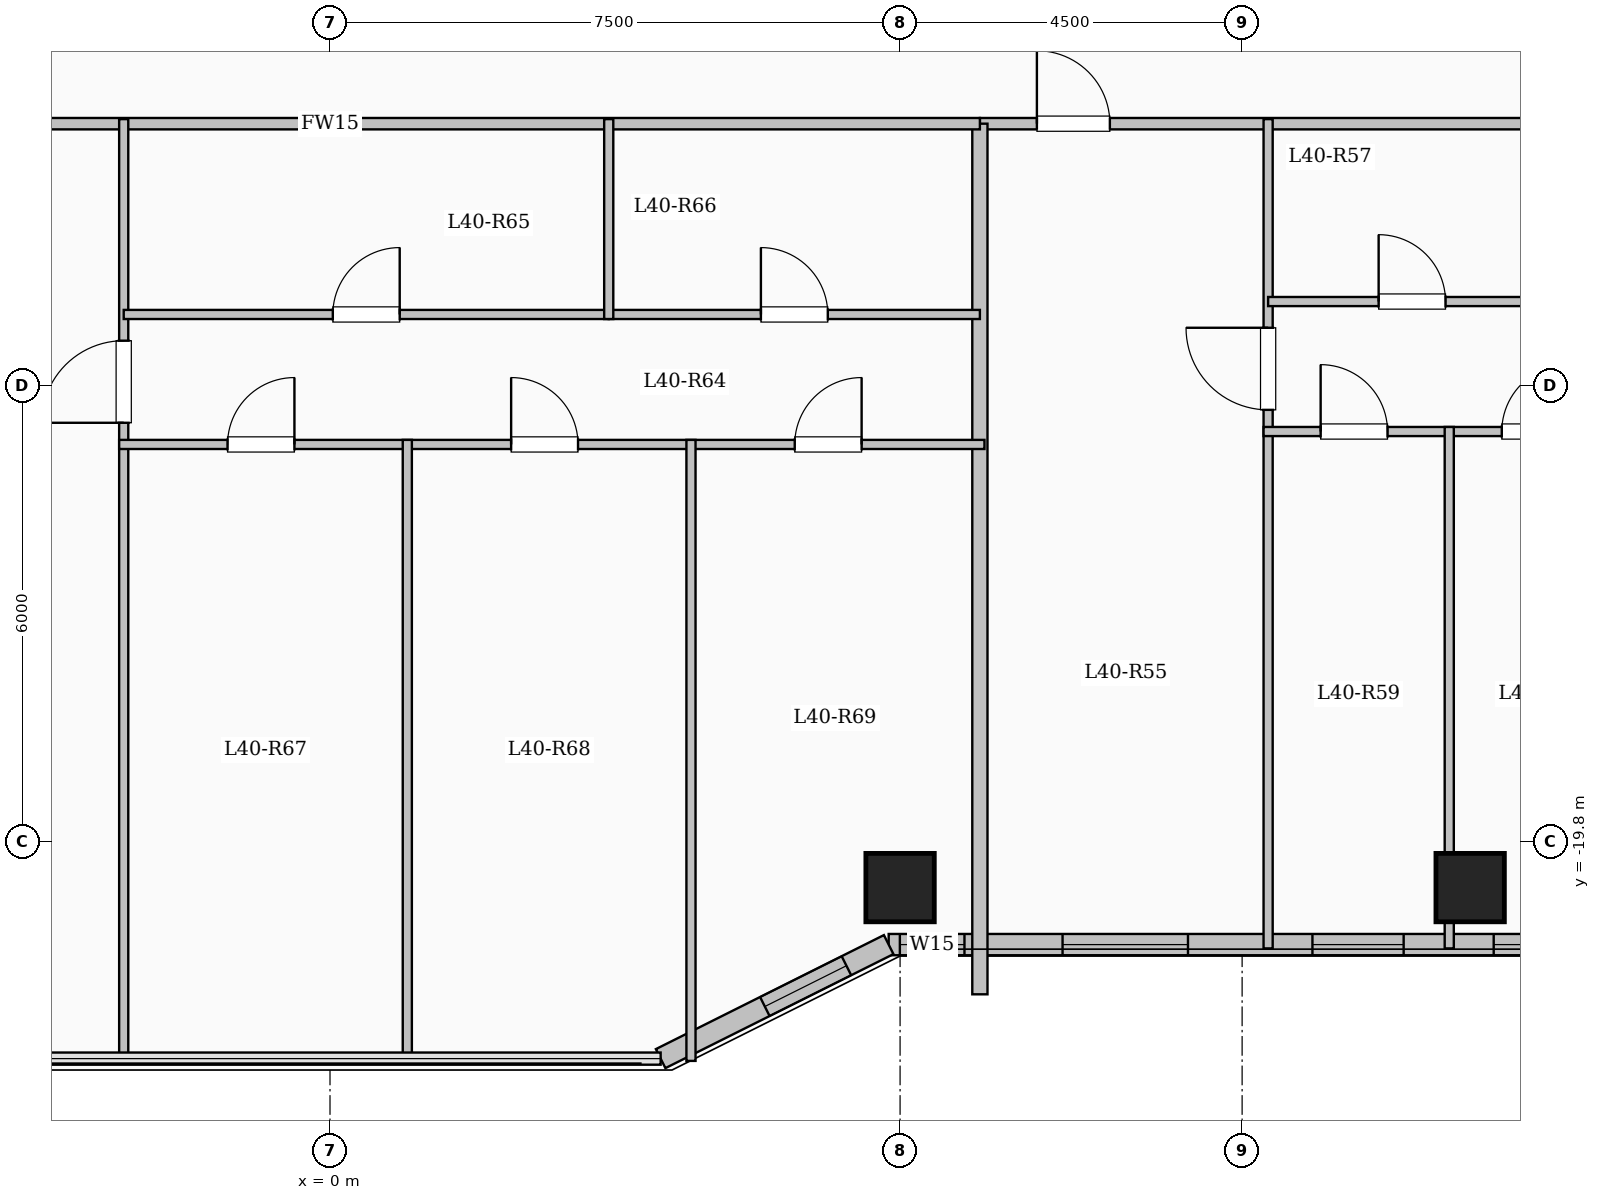
"""IFC4 building model, lengths in metres.
Left out: names, types, materials, properties, quantities, classifications, styles, units other than length and angle.
Written with IfcOpenShell. Run it as: python <this file> out.ifc"""

import sys

from ifc_helpers import new_model, si_unit, direction, frame, frame_2d, origin, origin_2d, place, context, subcontext, project, spatial, rectangle, extrude, element, fill, save


model = new_model("IFC4")
c1 = context("Model", 3, precision=1e-05, world=origin(), true_north=direction((0.0, 1.0)))
c2 = subcontext(c1, "Body", "Model", "MODEL_VIEW")
j1 = project(units=[si_unit("LENGTHUNIT", "METRE"), si_unit("PLANEANGLEUNIT", "RADIAN")], contexts=[c1])
p1 = place(None, origin())
s1 = spatial("IfcSite", under=j1, at=p1, CompositionType="ELEMENT")
p2 = place(p1, origin())
s2 = spatial("IfcBuilding", under=s1, at=p2, CompositionType="ELEMENT")
p3 = place(p2, frame((0.0, 0.0, 149.35)))
s3 = spatial("IfcBuildingStorey", under=s2, at=p3, CompositionType="ELEMENT", Elevation=149.35)
for number, where, z_axis, x_axis in (
    (1, (7.5, -20.4, 0.0), (0.0, 0.0, 1.0), (1.0, 0.0, 0.0)),
    (2, (15.0, -20.4, 0.0), (0.0, 0.0, 1.0), (1.0, 0.0, 0.0)),
):
    element("IfcColumn", number, at=place(p3, frame(where, z_axis=z_axis, x_axis=x_axis)), inside=s3, PredefinedType="COLUMN", context=c2, shape_type="SweptSolid", body=[
        extrude(rectangle(XDim=0.9, YDim=0.9, at=origin_2d()), origin(), (0.0, 0.0, 1.0), 3.35),
    ])
p4 = place(p3, frame((19.65, -21.15, 0.0), z_axis=(0.0, 0.0, 1.0), x_axis=(-1.0, 0.0, 0.0)))
e3 = element("IfcWall", 3, at=p4, inside=s3, PredefinedType="SOLIDWALL", context=c2, shape_type="SweptSolid", body=[
    extrude(rectangle(XDim=12.3, YDim=0.28, at=frame_2d((6.15, 0.0))), origin(), (0.0, 0.0, 1.0), 3.1),
])
p5 = place(p4, frame((0.705, 0.0, 0.95)))
e4 = element("IfcOpeningElement", 4, at=p5, cuts=e3, PredefinedType="OPENING", context=c2, shape_type="SweptSolid", body=[
    extrude(rectangle(XDim=1.2, YDim=1.5, at=frame_2d((0.6, 0.75))), frame((0.0, 0.15, 0.0), z_axis=(0.0, -1.0, 0.0), x_axis=(1.0, 0.0, 0.0)), (0.0, 0.0, 1.0), 0.3),
])
p6 = place(p4, frame((3.14, 0.0, 0.95)))
e5 = element("IfcOpeningElement", 5, at=p6, cuts=e3, PredefinedType="OPENING", context=c2, shape_type="SweptSolid", body=[
    extrude(rectangle(XDim=1.2, YDim=1.5, at=frame_2d((0.6, 0.75))), frame((0.0, 0.15, 0.0), z_axis=(0.0, -1.0, 0.0), x_axis=(1.0, 0.0, 0.0)), (0.0, 0.0, 1.0), 0.3),
])
p7 = place(p4, frame((5.525, 0.0, 0.95)))
e6 = element("IfcOpeningElement", 6, at=p7, cuts=e3, PredefinedType="OPENING", context=c2, shape_type="SweptSolid", body=[
    extrude(rectangle(XDim=1.2, YDim=1.5, at=frame_2d((0.6, 0.75))), frame((0.0, 0.15, 0.0), z_axis=(0.0, -1.0, 0.0), x_axis=(1.0, 0.0, 0.0)), (0.0, 0.0, 1.0), 0.3),
])
p8 = place(p4, frame((8.362, 0.0, 0.9)))
e7 = element("IfcOpeningElement", 7, at=p8, cuts=e3, PredefinedType="OPENING", context=c2, shape_type="SweptSolid", body=[
    extrude(rectangle(XDim=1.65, YDim=1.6, at=frame_2d((0.825, 0.8))), frame((0.0, 0.15, 0.0), z_axis=(0.0, -1.0, 0.0), x_axis=(1.0, 0.0, 0.0)), (0.0, 0.0, 1.0), 0.3),
])
p9 = place(p4, frame((11.303, 0.0, 0.95)))
e8 = element("IfcOpeningElement", 8, at=p9, cuts=e3, PredefinedType="OPENING", context=c2, shape_type="SweptSolid", body=[
    extrude(rectangle(XDim=0.85, YDim=1.5, at=frame_2d((0.425, 0.75))), frame((0.0, 0.15, 0.0), z_axis=(0.0, -1.0, 0.0), x_axis=(1.0, 0.0, 0.0)), (0.0, 0.0, 1.0), 0.3),
])
p10 = place(p3, frame((7.35, -21.15, 0.0), z_axis=(0.0, 0.0, 1.0), x_axis=(-0.894427191, -0.4472135955, 0.0)))
e9 = element("IfcWall", 9, at=p10, inside=s3, PredefinedType="SOLIDWALL", context=c2, shape_type="SweptSolid", body=[
    extrude(rectangle(XDim=3.354, YDim=0.28, at=frame_2d((1.677, 0.0))), origin(), (0.0, 0.0, 1.0), 3.1),
])
p11 = place(p10, frame((0.622, 0.0, 0.95)))
e10 = element("IfcOpeningElement", 10, at=p11, cuts=e9, PredefinedType="OPENING", context=c2, shape_type="SweptSolid", body=[
    extrude(rectangle(XDim=1.2, YDim=1.5, at=frame_2d((0.6, 0.75))), frame((0.0, 0.15, 0.0), z_axis=(0.0, -1.0, 0.0), x_axis=(1.0, 0.0, 0.0)), (0.0, 0.0, 1.0), 0.3),
])
p12 = place(p3, frame((8.55, -10.35, 0.0), z_axis=(0.0, 0.0, 1.0), x_axis=(1.0, 0.0, 0.0)))
e11 = element("IfcWall", 11, at=p12, inside=s3, PredefinedType="PARTITIONING", context=c2, shape_type="SweptSolid", body=[
    extrude(rectangle(XDim=11.0, YDim=0.15, at=frame_2d((5.5, 0.0))), origin(), (0.0, 0.0, 1.0), 3.1),
])
p13 = place(p12, frame((0.75, 0.0, 0.0)))
e12 = element("IfcOpeningElement", 12, at=p13, cuts=e11, PredefinedType="OPENING", context=c2, shape_type="SweptSolid", body=[
    extrude(rectangle(XDim=0.96, YDim=2.15, at=frame_2d((0.48, 1.075))), frame((0.0, 0.085, 0.0), z_axis=(0.0, -1.0, 0.0), x_axis=(1.0, 0.0, 0.0)), (0.0, 0.0, 1.0), 0.17),
])
p14 = place(p3, frame((12.342, -21.2, 0.0), z_axis=(0.0, 0.0, 1.0), x_axis=(0.0, 1.0, 0.0)))
e13 = element("IfcWall", 13, at=p14, inside=s3, PredefinedType="PARTITIONING", context=c2, shape_type="SweptSolid", body=[
    extrude(rectangle(XDim=10.91, YDim=0.12, at=frame_2d((5.455, 0.0))), origin(), (0.0, 0.0, 1.0), 3.1),
])
p15 = place(p14, frame((7.085, 0.0, 0.0)))
e14 = element("IfcOpeningElement", 14, at=p15, cuts=e13, PredefinedType="OPENING", context=c2, shape_type="SweptSolid", body=[
    extrude(rectangle(XDim=1.08, YDim=2.15, at=frame_2d((0.54, 1.075))), frame((0.0, 0.07, 0.0), z_axis=(0.0, -1.0, 0.0), x_axis=(1.0, 0.0, 0.0)), (0.0, 0.0, 1.0), 0.14),
])
p16 = place(p3, frame((12.342, -12.69, 0.0), z_axis=(0.0, 0.0, 1.0), x_axis=(1.0, 0.0, 0.0)))
e15 = element("IfcWall", 15, at=p16, inside=s3, PredefinedType="PARTITIONING", context=c2, shape_type="SweptSolid", body=[
    extrude(rectangle(XDim=3.788, YDim=0.12, at=frame_2d((1.894, 0.0))), origin(), (0.0, 0.0, 1.0), 3.1),
])
p17 = place(p16, frame((1.454, 0.0, 0.0)))
e16 = element("IfcOpeningElement", 16, at=p17, cuts=e15, PredefinedType="OPENING", context=c2, shape_type="SweptSolid", body=[
    extrude(rectangle(XDim=0.88, YDim=2.1, at=frame_2d((0.44, 1.05))), frame((0.0, 0.07, 0.0), z_axis=(0.0, -1.0, 0.0), x_axis=(1.0, 0.0, 0.0)), (0.0, 0.0, 1.0), 0.14),
])
p18 = place(p3, frame((12.282, -14.4, 0.0), z_axis=(0.0, 0.0, 1.0), x_axis=(1.0, 0.0, 0.0)))
e17 = element("IfcWall", 17, at=p18, inside=s3, PredefinedType="PARTITIONING", context=c2, shape_type="SweptSolid", body=[
    extrude(rectangle(XDim=7.328, YDim=0.12, at=frame_2d((3.664, 0.0))), origin(), (0.0, 0.0, 1.0), 3.1),
])
p19 = place(p18, frame((0.751, 0.0, 0.0)))
e18 = element("IfcOpeningElement", 18, at=p19, cuts=e17, PredefinedType="OPENING", context=c2, shape_type="SweptSolid", body=[
    extrude(rectangle(XDim=0.88, YDim=2.1, at=frame_2d((0.44, 1.05))), frame((0.0, 0.07, 0.0), z_axis=(0.0, -1.0, 0.0), x_axis=(1.0, 0.0, 0.0)), (0.0, 0.0, 1.0), 0.14),
])
p20 = place(p18, frame((3.134, 0.0, 0.0)))
e19 = element("IfcOpeningElement", 19, at=p20, cuts=e17, PredefinedType="OPENING", context=c2, shape_type="SweptSolid", body=[
    extrude(rectangle(XDim=0.88, YDim=2.1, at=frame_2d((0.44, 1.05))), frame((0.0, 0.07, 0.0), z_axis=(0.0, -1.0, 0.0), x_axis=(1.0, 0.0, 0.0)), (0.0, 0.0, 1.0), 0.14),
])
p21 = place(p18, frame((5.517, 0.0, 0.0)))
e20 = element("IfcOpeningElement", 20, at=p21, cuts=e17, PredefinedType="OPENING", context=c2, shape_type="SweptSolid", body=[
    extrude(rectangle(XDim=0.88, YDim=2.1, at=frame_2d((0.44, 1.05))), frame((0.0, 0.07, 0.0), z_axis=(0.0, -1.0, 0.0), x_axis=(1.0, 0.0, 0.0)), (0.0, 0.0, 1.0), 0.14),
])
p22 = place(p3, frame((14.725, -21.2, 0.0), z_axis=(0.0, 0.0, 1.0), x_axis=(0.0, 1.0, 0.0)))
e21 = element("IfcWall", 21, at=p22, inside=s3, PredefinedType="PARTITIONING", context=c2, shape_type="SweptSolid", body=[
    extrude(rectangle(XDim=6.86, YDim=0.12, at=frame_2d((3.43, 0.0))), origin(), (0.0, 0.0, 1.0), 2.585),
])
p23 = place(p3, frame((8.55, -21.804, 0.0), z_axis=(0.0, 0.0, 1.0), x_axis=(0.0, 1.0, 0.0)))
e22 = element("IfcWall", 22, at=p23, inside=s3, PredefinedType="SOLIDWALL", context=c2, shape_type="SweptSolid", body=[
    extrude(rectangle(XDim=11.454, YDim=0.2, at=frame_2d((5.727, 0.0))), origin(), (0.0, 0.0, 1.0), 3.1),
])
p24 = place(p3, frame((-8.55, -10.35, 0.0), z_axis=(0.0, 0.0, 1.0), x_axis=(1.0, 0.0, 0.0)))
e23 = element("IfcWall", 23, at=p24, inside=s3, PredefinedType="PARTITIONING", context=c2, shape_type="SweptSolid", body=[
    extrude(rectangle(XDim=17.1, YDim=0.15, at=frame_2d((8.55, 0.0))), origin(), (0.0, 0.0, 1.0), 3.1),
])
p25 = place(p24, frame((1.6, 0.0, 0.0)))
e24 = element("IfcOpeningElement", 24, at=p25, cuts=e23, PredefinedType="OPENING", context=c2, shape_type="SweptSolid", body=[
    extrude(rectangle(XDim=0.96, YDim=2.15, at=frame_2d((0.48, 1.075))), frame((0.0, 0.085, 0.0), z_axis=(0.0, -1.0, 0.0), x_axis=(1.0, 0.0, 0.0)), (0.0, 0.0, 1.0), 0.17),
])
p26 = place(p3, frame((-2.714, -22.68, 0.0), z_axis=(0.0, 0.0, 1.0), x_axis=(0.0, 1.0, 0.0)))
e25 = element("IfcWall", 25, at=p26, inside=s3, PredefinedType="PARTITIONING", context=c2, shape_type="SweptSolid", body=[
    extrude(rectangle(XDim=12.39, YDim=0.12, at=frame_2d((6.195, 0.0))), origin(), (0.0, 0.0, 1.0), 3.1),
])
p27 = place(p26, frame((8.395, 0.0, 0.0)))
e26 = element("IfcOpeningElement", 26, at=p27, cuts=e25, PredefinedType="OPENING", context=c2, shape_type="SweptSolid", body=[
    extrude(rectangle(XDim=1.08, YDim=2.15, at=frame_2d((0.54, 1.075))), frame((0.0, 0.07, 0.0), z_axis=(0.0, -1.0, 0.0), x_axis=(1.0, 0.0, 0.0)), (0.0, 0.0, 1.0), 0.14),
])
p28 = place(p3, frame((-2.714, -12.86, 0.0), z_axis=(0.0, 0.0, 1.0), x_axis=(1.0, 0.0, 0.0)))
e27 = element("IfcWall", 27, at=p28, inside=s3, PredefinedType="PARTITIONING", context=c2, shape_type="SweptSolid", body=[
    extrude(rectangle(XDim=6.381, YDim=0.12, at=frame_2d((3.19, 0.0))), origin(), (0.0, 0.0, 1.0), 3.1),
])
p29 = place(p28, frame((2.751, 0.0, 0.0)))
e28 = element("IfcOpeningElement", 28, at=p29, cuts=e27, PredefinedType="OPENING", context=c2, shape_type="SweptSolid", body=[
    extrude(rectangle(XDim=0.88, YDim=2.1, at=frame_2d((0.44, 1.05))), frame((0.0, 0.07, 0.0), z_axis=(0.0, -1.0, 0.0), x_axis=(1.0, 0.0, 0.0)), (0.0, 0.0, 1.0), 0.14),
])
p30 = place(p3, frame((3.667, -12.86, 0.0), z_axis=(0.0, 0.0, 1.0), x_axis=(1.0, 0.0, 0.0)))
e29 = element("IfcWall", 29, at=p30, inside=s3, PredefinedType="PARTITIONING", context=c2, shape_type="SweptSolid", body=[
    extrude(rectangle(XDim=4.883, YDim=0.12, at=frame_2d((2.441, 0.0))), origin(), (0.0, 0.0, 1.0), 3.1),
])
p31 = place(p30, frame((2.002, 0.0, 0.0)))
e30 = element("IfcOpeningElement", 30, at=p31, cuts=e29, PredefinedType="OPENING", context=c2, shape_type="SweptSolid", body=[
    extrude(rectangle(XDim=0.88, YDim=2.1, at=frame_2d((0.44, 1.05))), frame((0.0, 0.07, 0.0), z_axis=(0.0, -1.0, 0.0), x_axis=(1.0, 0.0, 0.0)), (0.0, 0.0, 1.0), 0.14),
])
p32 = place(p3, frame((-2.774, -14.57, 0.0), z_axis=(0.0, 0.0, 1.0), x_axis=(1.0, 0.0, 0.0)))
e31 = element("IfcWall", 31, at=p32, inside=s3, PredefinedType="PARTITIONING", context=c2, shape_type="SweptSolid", body=[
    extrude(rectangle(XDim=11.384, YDim=0.12, at=frame_2d((5.692, 0.0))), origin(), (0.0, 0.0, 1.0), 3.1),
])
p33 = place(p32, frame((1.426, 0.0, 0.0)))
e32 = element("IfcOpeningElement", 32, at=p33, cuts=e31, PredefinedType="OPENING", context=c2, shape_type="SweptSolid", body=[
    extrude(rectangle(XDim=0.88, YDim=2.1, at=frame_2d((0.44, 1.05))), frame((0.0, 0.07, 0.0), z_axis=(0.0, -1.0, 0.0), x_axis=(1.0, 0.0, 0.0)), (0.0, 0.0, 1.0), 0.14),
])
p34 = place(p32, frame((5.157, 0.0, 0.0)))
e33 = element("IfcOpeningElement", 33, at=p34, cuts=e31, PredefinedType="OPENING", context=c2, shape_type="SweptSolid", body=[
    extrude(rectangle(XDim=0.88, YDim=2.1, at=frame_2d((0.44, 1.05))), frame((0.0, 0.07, 0.0), z_axis=(0.0, -1.0, 0.0), x_axis=(1.0, 0.0, 0.0)), (0.0, 0.0, 1.0), 0.14),
])
p35 = place(p32, frame((8.888, 0.0, 0.0)))
e34 = element("IfcOpeningElement", 34, at=p35, cuts=e31, PredefinedType="OPENING", context=c2, shape_type="SweptSolid", body=[
    extrude(rectangle(XDim=0.88, YDim=2.1, at=frame_2d((0.44, 1.05))), frame((0.0, 0.07, 0.0), z_axis=(0.0, -1.0, 0.0), x_axis=(1.0, 0.0, 0.0)), (0.0, 0.0, 1.0), 0.14),
])
p36 = place(p3, frame((3.667, -12.92, 0.0), z_axis=(0.0, 0.0, 1.0), x_axis=(0.0, 1.0, 0.0)))
e35 = element("IfcWall", 35, at=p36, inside=s3, PredefinedType="PARTITIONING", context=c2, shape_type="SweptSolid", body=[
    extrude(rectangle(XDim=2.63, YDim=0.12, at=frame_2d((1.315, 0.0))), origin(), (0.0, 0.0, 1.0), 3.1),
])
for number, where, z_axis, x_axis in (
    (36, (1.017, -22.68, 0.0), (0.0, 0.0, 1.0), (0.0, 1.0, 0.0)),
    (37, (4.749, -22.68, 0.0), (0.0, 0.0, 1.0), (0.0, 1.0, 0.0)),
):
    element("IfcWall", number, at=place(p3, frame(where, z_axis=z_axis, x_axis=x_axis)), inside=s3, PredefinedType="PARTITIONING", context=c2, shape_type="SweptSolid", body=[
        extrude(rectangle(XDim=8.17, YDim=0.12, at=frame_2d((4.085, 0.0))), origin(), (0.0, 0.0, 1.0), 3.1),
    ])
p37 = place(p6, origin())
e38 = element("IfcWindow", 38, at=p37, inside=s3, PartitioningType="SINGLE_PANEL", PredefinedType="WINDOW", context=c2, shape_type="SweptSolid", body=[
    extrude(rectangle(XDim=1.2, YDim=1.5, at=frame_2d((0.6, 0.75))), frame((0.0, 0.03, 0.0), z_axis=(0.0, -1.0, 0.0), x_axis=(1.0, 0.0, 0.0)), (0.0, 0.0, 1.0), 0.06),
])
fill(e5, e38)
p38 = place(p7, origin())
e39 = element("IfcWindow", 39, at=p38, inside=s3, PartitioningType="SINGLE_PANEL", PredefinedType="WINDOW", context=c2, shape_type="SweptSolid", body=[
    extrude(rectangle(XDim=1.2, YDim=1.5, at=frame_2d((0.6, 0.75))), frame((0.0, 0.03, 0.0), z_axis=(0.0, -1.0, 0.0), x_axis=(1.0, 0.0, 0.0)), (0.0, 0.0, 1.0), 0.06),
])
fill(e6, e39)
p39 = place(p8, origin())
e40 = element("IfcWindow", 40, at=p39, inside=s3, PartitioningType="SINGLE_PANEL", PredefinedType="WINDOW", context=c2, shape_type="SweptSolid", body=[
    extrude(rectangle(XDim=1.65, YDim=1.6, at=frame_2d((0.825, 0.8))), frame((0.0, 0.03, 0.0), z_axis=(0.0, -1.0, 0.0), x_axis=(1.0, 0.0, 0.0)), (0.0, 0.0, 1.0), 0.06),
])
fill(e7, e40)
p40 = place(p9, origin())
e41 = element("IfcWindow", 41, at=p40, inside=s3, PartitioningType="SINGLE_PANEL", PredefinedType="WINDOW", context=c2, shape_type="SweptSolid", body=[
    extrude(rectangle(XDim=0.85, YDim=1.5, at=frame_2d((0.425, 0.75))), frame((0.0, 0.03, 0.0), z_axis=(0.0, -1.0, 0.0), x_axis=(1.0, 0.0, 0.0)), (0.0, 0.0, 1.0), 0.06),
])
fill(e8, e41)
p41 = place(p11, origin())
e42 = element("IfcWindow", 42, at=p41, inside=s3, PartitioningType="SINGLE_PANEL", PredefinedType="WINDOW", context=c2, shape_type="SweptSolid", body=[
    extrude(rectangle(XDim=1.2, YDim=1.5, at=frame_2d((0.6, 0.75))), frame((0.0, 0.03, 0.0), z_axis=(0.0, -1.0, 0.0), x_axis=(1.0, 0.0, 0.0)), (0.0, 0.0, 1.0), 0.06),
])
fill(e10, e42)
p42 = place(p13, origin())
e43 = element("IfcDoor", 43, at=p42, inside=s3, OperationType="SINGLE_SWING_LEFT", PredefinedType="DOOR", context=c2, shape_type="SweptSolid", body=[
    extrude(rectangle(XDim=0.96, YDim=2.15, at=frame_2d((0.48, 1.075))), frame((0.0, 0.025, 0.0), z_axis=(0.0, -1.0, 0.0), x_axis=(1.0, 0.0, 0.0)), (0.0, 0.0, 1.0), 0.05),
])
fill(e12, e43)
p43 = place(p15, origin())
e44 = element("IfcDoor", 44, at=p43, inside=s3, OperationType="SINGLE_SWING_RIGHT", PredefinedType="DOOR", context=c2, shape_type="SweptSolid", body=[
    extrude(rectangle(XDim=1.08, YDim=2.15, at=frame_2d((0.54, 1.075))), frame((0.0, 0.025, 0.0), z_axis=(0.0, -1.0, 0.0), x_axis=(1.0, 0.0, 0.0)), (0.0, 0.0, 1.0), 0.05),
])
fill(e14, e44)
p44 = place(p17, origin())
e45 = element("IfcDoor", 45, at=p44, inside=s3, OperationType="SINGLE_SWING_LEFT", PredefinedType="DOOR", context=c2, shape_type="SweptSolid", body=[
    extrude(rectangle(XDim=0.88, YDim=2.1, at=frame_2d((0.44, 1.05))), frame((0.0, 0.025, 0.0), z_axis=(0.0, -1.0, 0.0), x_axis=(1.0, 0.0, 0.0)), (0.0, 0.0, 1.0), 0.05),
])
fill(e16, e45)
p45 = place(p19, origin())
e46 = element("IfcDoor", 46, at=p45, inside=s3, OperationType="SINGLE_SWING_LEFT", PredefinedType="DOOR", context=c2, shape_type="SweptSolid", body=[
    extrude(rectangle(XDim=0.88, YDim=2.1, at=frame_2d((0.44, 1.05))), frame((0.0, 0.025, 0.0), z_axis=(0.0, -1.0, 0.0), x_axis=(1.0, 0.0, 0.0)), (0.0, 0.0, 1.0), 0.05),
])
fill(e18, e46)
p46 = place(p20, origin())
e47 = element("IfcDoor", 47, at=p46, inside=s3, OperationType="SINGLE_SWING_RIGHT", PredefinedType="DOOR", context=c2, shape_type="SweptSolid", body=[
    extrude(rectangle(XDim=0.88, YDim=2.1, at=frame_2d((0.44, 1.05))), frame((0.0, 0.025, 0.0), z_axis=(0.0, -1.0, 0.0), x_axis=(1.0, 0.0, 0.0)), (0.0, 0.0, 1.0), 0.05),
])
fill(e19, e47)
p47 = place(p27, origin())
e48 = element("IfcDoor", 48, at=p47, inside=s3, OperationType="SINGLE_SWING_LEFT", PredefinedType="DOOR", context=c2, shape_type="SweptSolid", body=[
    extrude(rectangle(XDim=1.08, YDim=2.15, at=frame_2d((0.54, 1.075))), frame((0.0, 0.025, 0.0), z_axis=(0.0, -1.0, 0.0), x_axis=(1.0, 0.0, 0.0)), (0.0, 0.0, 1.0), 0.05),
])
fill(e26, e48)
p48 = place(p29, origin())
e49 = element("IfcDoor", 49, at=p48, inside=s3, OperationType="SINGLE_SWING_RIGHT", PredefinedType="DOOR", context=c2, shape_type="SweptSolid", body=[
    extrude(rectangle(XDim=0.88, YDim=2.1, at=frame_2d((0.44, 1.05))), frame((0.0, 0.025, 0.0), z_axis=(0.0, -1.0, 0.0), x_axis=(1.0, 0.0, 0.0)), (0.0, 0.0, 1.0), 0.05),
])
fill(e28, e49)
p49 = place(p31, origin())
e50 = element("IfcDoor", 50, at=p49, inside=s3, OperationType="SINGLE_SWING_LEFT", PredefinedType="DOOR", context=c2, shape_type="SweptSolid", body=[
    extrude(rectangle(XDim=0.88, YDim=2.1, at=frame_2d((0.44, 1.05))), frame((0.0, 0.025, 0.0), z_axis=(0.0, -1.0, 0.0), x_axis=(1.0, 0.0, 0.0)), (0.0, 0.0, 1.0), 0.05),
])
fill(e30, e50)
p50 = place(p33, origin())
e51 = element("IfcDoor", 51, at=p50, inside=s3, OperationType="SINGLE_SWING_RIGHT", PredefinedType="DOOR", context=c2, shape_type="SweptSolid", body=[
    extrude(rectangle(XDim=0.88, YDim=2.1, at=frame_2d((0.44, 1.05))), frame((0.0, 0.025, 0.0), z_axis=(0.0, -1.0, 0.0), x_axis=(1.0, 0.0, 0.0)), (0.0, 0.0, 1.0), 0.05),
])
fill(e32, e51)
p51 = place(p34, origin())
e52 = element("IfcDoor", 52, at=p51, inside=s3, OperationType="SINGLE_SWING_LEFT", PredefinedType="DOOR", context=c2, shape_type="SweptSolid", body=[
    extrude(rectangle(XDim=0.88, YDim=2.1, at=frame_2d((0.44, 1.05))), frame((0.0, 0.025, 0.0), z_axis=(0.0, -1.0, 0.0), x_axis=(1.0, 0.0, 0.0)), (0.0, 0.0, 1.0), 0.05),
])
fill(e33, e52)
p52 = place(p35, origin())
e53 = element("IfcDoor", 53, at=p52, inside=s3, OperationType="SINGLE_SWING_RIGHT", PredefinedType="DOOR", context=c2, shape_type="SweptSolid", body=[
    extrude(rectangle(XDim=0.88, YDim=2.1, at=frame_2d((0.44, 1.05))), frame((0.0, 0.025, 0.0), z_axis=(0.0, -1.0, 0.0), x_axis=(1.0, 0.0, 0.0)), (0.0, 0.0, 1.0), 0.05),
])
fill(e34, e53)
save(model, sys.argv[1])
